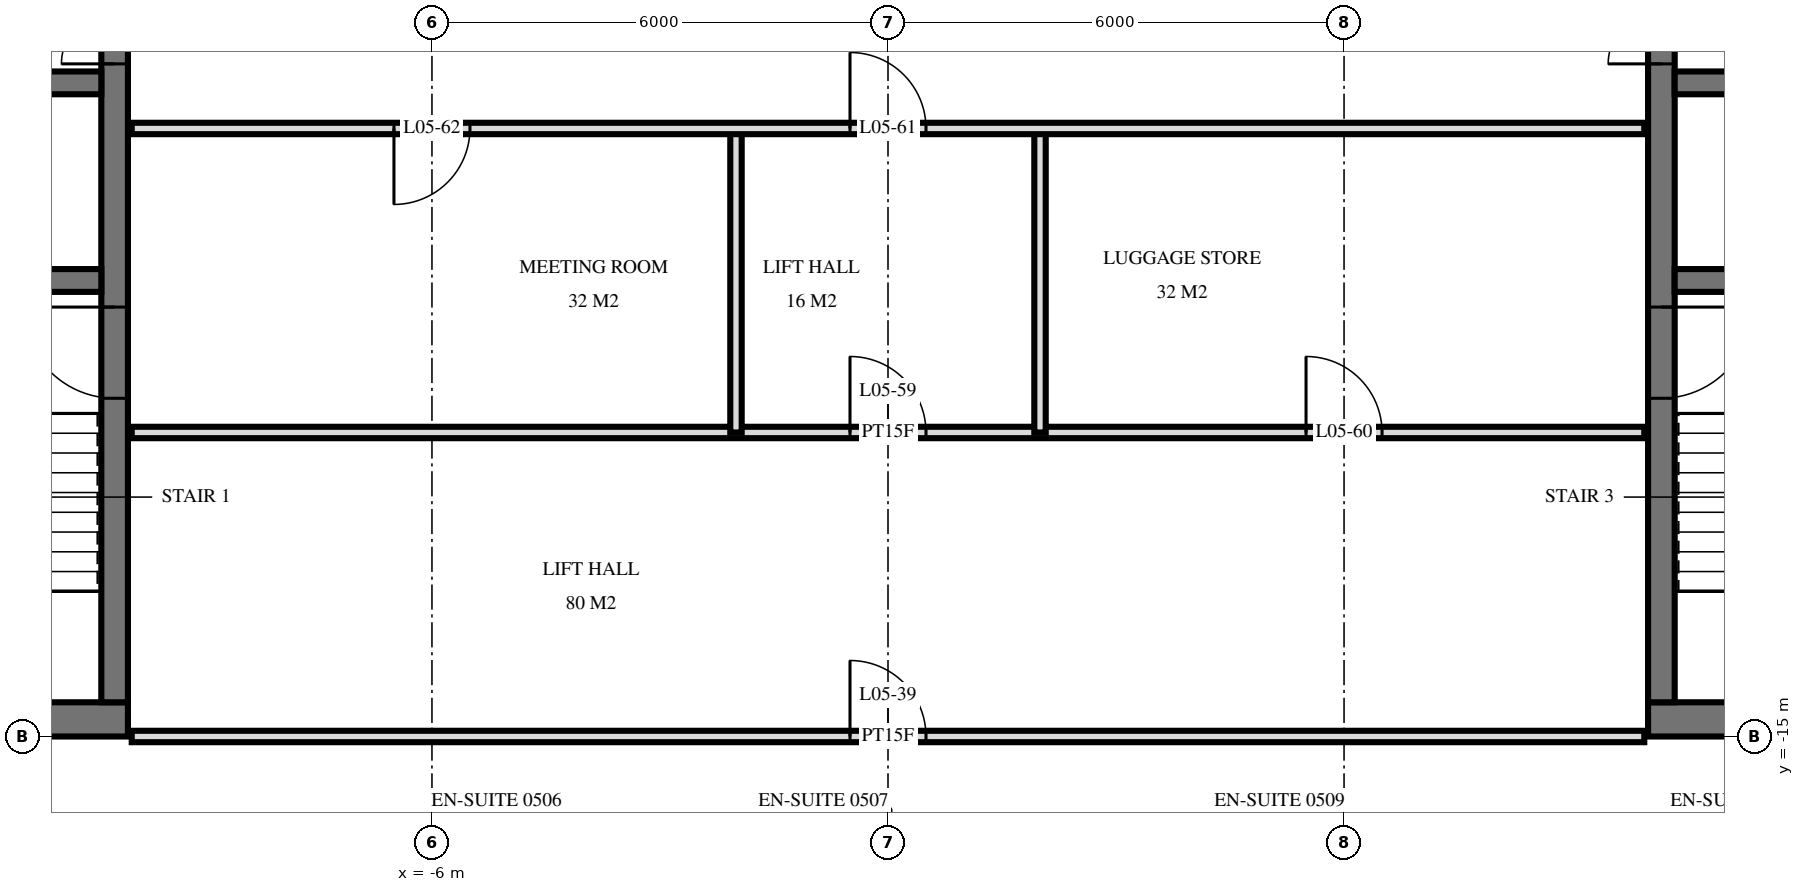
"""IFC4 building model, lengths in metres.
Left out: names, types, materials, properties, quantities, classifications, styles, units other than length and angle.
Written with IfcOpenShell. Run it as: python <this file> out.ifc"""

import sys

from ifc_helpers import new_model, si_unit, direction, frame, frame_2d, origin, place, context, subcontext, project, spatial, rectangle, extrude, element, fill, save


model = new_model("IFC4")
c1 = context("Model", 3, precision=1e-05, world=origin(), true_north=direction((0.0, 1.0)))
c2 = subcontext(c1, "Body", "Model", "MODEL_VIEW")
j1 = project(units=[si_unit("LENGTHUNIT", "METRE"), si_unit("PLANEANGLEUNIT", "RADIAN")], contexts=[c1])
p1 = place(None, origin())
s1 = spatial("IfcSite", under=j1, at=p1, CompositionType="ELEMENT")
p2 = place(p1, origin())
s2 = spatial("IfcBuilding", under=s1, at=p2, CompositionType="ELEMENT")
p3 = place(p2, frame((0.0, 0.0, 27.6)))
s3 = spatial("IfcBuildingStorey", under=s2, at=p3, CompositionType="ELEMENT", Elevation=27.6)
p4 = place(p3, frame((-29.5, -14.775, 0.0), z_axis=(0.0, 0.0, 1.0), x_axis=(1.0, 0.0, 0.0)))
e1 = element("IfcWall", 1, at=p4, inside=s3, PredefinedType="SHEAR", context=c2, shape_type="SweptSolid", body=[
    extrude(rectangle(XDim=19.5, YDim=0.45, at=frame_2d((9.75, 0.0))), origin(), (0.0, 0.0, 1.0), 3.6),
])
p5 = place(p4, frame((11.2, 0.0, 0.0)))
e2 = element("IfcOpeningElement", 2, at=p5, cuts=e1, PredefinedType="OPENING", context=c2, shape_type="SweptSolid", body=[
    extrude(rectangle(XDim=1.2, YDim=2.1, at=frame_2d((0.6, 1.05))), frame((0.0, 0.235, 0.0), z_axis=(0.0, -1.0, 0.0), x_axis=(1.0, 0.0, 0.0)), (0.0, 0.0, 1.0), 0.47),
])
p6 = place(p4, frame((14.25, 0.0, 0.0)))
e3 = element("IfcOpeningElement", 3, at=p6, cuts=e1, PredefinedType="OPENING", context=c2, shape_type="SweptSolid", body=[
    extrude(rectangle(XDim=1.1, YDim=2.1, at=frame_2d((0.55, 1.05))), frame((0.0, 0.235, 0.0), z_axis=(0.0, -1.0, 0.0), x_axis=(1.0, 0.0, 0.0)), (0.0, 0.0, 1.0), 0.47),
])
p7 = place(p4, frame((8.5, 0.0, 0.0)))
e4 = element("IfcOpeningElement", 4, at=p7, cuts=e1, PredefinedType="OPENING", context=c2, shape_type="SweptSolid", body=[
    extrude(rectangle(XDim=0.9, YDim=2.1, at=frame_2d((0.45, 1.05))), frame((0.0, 0.235, 0.0), z_axis=(0.0, -1.0, 0.0), x_axis=(1.0, 0.0, 0.0)), (0.0, 0.0, 1.0), 0.47),
])
p8 = place(p4, frame((6.05, 0.0, 0.0)))
e5 = element("IfcOpeningElement", 5, at=p8, cuts=e1, PredefinedType="OPENING", context=c2, shape_type="SweptSolid", body=[
    extrude(rectangle(XDim=1.0, YDim=2.1, at=frame_2d((0.5, 1.05))), frame((0.0, 0.235, 0.0), z_axis=(0.0, -1.0, 0.0), x_axis=(1.0, 0.0, 0.0)), (0.0, 0.0, 1.0), 0.47),
])
p9 = place(p4, frame((2.25, 0.0, 0.0)))
e6 = element("IfcOpeningElement", 6, at=p9, cuts=e1, PredefinedType="OPENING", context=c2, shape_type="SweptSolid", body=[
    extrude(rectangle(XDim=1.0, YDim=2.1, at=frame_2d((0.5, 1.05))), frame((0.0, 0.235, 0.0), z_axis=(0.0, -1.0, 0.0), x_axis=(1.0, 0.0, 0.0)), (0.0, 0.0, 1.0), 0.47),
])
p10 = place(p3, frame((-10.175, -14.55, 0.0), z_axis=(0.0, 0.0, 1.0), x_axis=(0.0, 1.0, 0.0)))
e7 = element("IfcWall", 7, at=p10, inside=s3, PredefinedType="SHEAR", context=c2, shape_type="SweptSolid", body=[
    extrude(rectangle(XDim=14.1, YDim=0.35, at=frame_2d((7.05, 0.0))), origin(), (0.0, 0.0, 1.0), 3.6),
])
p11 = place(p10, frame((8.4, 0.0, 0.0)))
e8 = element("IfcOpeningElement", 8, at=p11, cuts=e7, PredefinedType="OPENING", context=c2, shape_type="SweptSolid", body=[
    extrude(rectangle(XDim=1.4, YDim=2.4, at=frame_2d((0.7, 1.2))), frame((0.0, 0.185, 0.0), z_axis=(0.0, -1.0, 0.0), x_axis=(1.0, 0.0, 0.0)), (0.0, 0.0, 1.0), 0.37),
])
p12 = place(p10, frame((10.0, 0.0, 0.0)))
e9 = element("IfcOpeningElement", 9, at=p12, cuts=e7, PredefinedType="OPENING", context=c2, shape_type="SweptSolid", body=[
    extrude(rectangle(XDim=1.4, YDim=2.4, at=frame_2d((0.7, 1.2))), frame((0.0, 0.185, 0.0), z_axis=(0.0, -1.0, 0.0), x_axis=(1.0, 0.0, 0.0)), (0.0, 0.0, 1.0), 0.37),
])
p13 = place(p10, frame((4.0, 0.0, 0.0)))
e10 = element("IfcOpeningElement", 10, at=p13, cuts=e7, PredefinedType="OPENING", context=c2, shape_type="SweptSolid", body=[
    extrude(rectangle(XDim=1.2, YDim=2.1, at=frame_2d((0.6, 1.05))), frame((0.0, 0.185, 0.0), z_axis=(0.0, -1.0, 0.0), x_axis=(1.0, 0.0, 0.0)), (0.0, 0.0, 1.0), 0.37),
])
p14 = place(p3, frame((-29.05, -6.4, 0.0), z_axis=(0.0, 0.0, 1.0), x_axis=(1.0, 0.0, 0.0)))
e11 = element("IfcWall", 11, at=p14, inside=s3, PredefinedType="SHEAR", context=c2, shape_type="SweptSolid", body=[
    extrude(rectangle(XDim=18.7, YDim=0.3, at=frame_2d((9.35, 0.0))), origin(), (0.0, 0.0, 1.0), 3.6),
])
p15 = place(p14, frame((2.95, 0.0, 0.0)))
e12 = element("IfcOpeningElement", 12, at=p15, cuts=e11, PredefinedType="OPENING", context=c2, shape_type="SweptSolid", body=[
    extrude(rectangle(XDim=1.1, YDim=2.1, at=frame_2d((0.55, 1.05))), frame((0.0, 0.16, 0.0), z_axis=(0.0, -1.0, 0.0), x_axis=(1.0, 0.0, 0.0)), (0.0, 0.0, 1.0), 0.32),
])
p16 = place(p14, frame((0.55, 0.0, 0.0)))
e13 = element("IfcOpeningElement", 13, at=p16, cuts=e11, PredefinedType="OPENING", context=c2, shape_type="SweptSolid", body=[
    extrude(rectangle(XDim=1.1, YDim=2.1, at=frame_2d((0.55, 1.05))), frame((0.0, 0.16, 0.0), z_axis=(0.0, -1.0, 0.0), x_axis=(1.0, 0.0, 0.0)), (0.0, 0.0, 1.0), 0.32),
])
p17 = place(p14, frame((10.8, 0.0, 0.0)))
e14 = element("IfcOpeningElement", 14, at=p17, cuts=e11, PredefinedType="OPENING", context=c2, shape_type="SweptSolid", body=[
    extrude(rectangle(XDim=1.1, YDim=2.1, at=frame_2d((0.55, 1.05))), frame((0.0, 0.16, 0.0), z_axis=(0.0, -1.0, 0.0), x_axis=(1.0, 0.0, 0.0)), (0.0, 0.0, 1.0), 0.32),
])
p18 = place(p14, frame((5.6, 0.0, 0.0)))
e15 = element("IfcOpeningElement", 15, at=p18, cuts=e11, PredefinedType="OPENING", context=c2, shape_type="SweptSolid", body=[
    extrude(rectangle(XDim=1.0, YDim=2.1, at=frame_2d((0.5, 1.05))), frame((0.0, 0.16, 0.0), z_axis=(0.0, -1.0, 0.0), x_axis=(1.0, 0.0, 0.0)), (0.0, 0.0, 1.0), 0.32),
])
p19 = place(p3, frame((-29.05, -9.0, 0.0), z_axis=(0.0, 0.0, 1.0), x_axis=(1.0, 0.0, 0.0)))
e16 = element("IfcWall", 16, at=p19, inside=s3, PredefinedType="SHEAR", context=c2, shape_type="SweptSolid", body=[
    extrude(rectangle(XDim=18.7, YDim=0.3, at=frame_2d((9.35, 0.0))), origin(), (0.0, 0.0, 1.0), 3.6),
])
p20 = place(p19, frame((13.8, 0.0, 0.0)))
e17 = element("IfcOpeningElement", 17, at=p20, cuts=e16, PredefinedType="OPENING", context=c2, shape_type="SweptSolid", body=[
    extrude(rectangle(XDim=1.1, YDim=2.1, at=frame_2d((0.55, 1.05))), frame((0.0, 0.16, 0.0), z_axis=(0.0, -1.0, 0.0), x_axis=(1.0, 0.0, 0.0)), (0.0, 0.0, 1.0), 0.32),
])
p21 = place(p3, frame((10.0, -14.775, 0.0), z_axis=(0.0, 0.0, 1.0), x_axis=(1.0, 0.0, 0.0)))
e18 = element("IfcWall", 18, at=p21, inside=s3, PredefinedType="SHEAR", context=c2, shape_type="SweptSolid", body=[
    extrude(rectangle(XDim=19.5, YDim=0.45, at=frame_2d((9.75, 0.0))), origin(), (0.0, 0.0, 1.0), 3.6),
])
p22 = place(p21, frame((7.1, 0.0, 0.0)))
e19 = element("IfcOpeningElement", 19, at=p22, cuts=e18, PredefinedType="OPENING", context=c2, shape_type="SweptSolid", body=[
    extrude(rectangle(XDim=1.2, YDim=2.1, at=frame_2d((0.6, 1.05))), frame((0.0, 0.235, 0.0), z_axis=(0.0, -1.0, 0.0), x_axis=(1.0, 0.0, 0.0)), (0.0, 0.0, 1.0), 0.47),
])
p23 = place(p21, frame((4.15, 0.0, 0.0)))
e20 = element("IfcOpeningElement", 20, at=p23, cuts=e18, PredefinedType="OPENING", context=c2, shape_type="SweptSolid", body=[
    extrude(rectangle(XDim=1.1, YDim=2.1, at=frame_2d((0.55, 1.05))), frame((0.0, 0.235, 0.0), z_axis=(0.0, -1.0, 0.0), x_axis=(1.0, 0.0, 0.0)), (0.0, 0.0, 1.0), 0.47),
])
p24 = place(p21, frame((10.1, 0.0, 0.0)))
e21 = element("IfcOpeningElement", 21, at=p24, cuts=e18, PredefinedType="OPENING", context=c2, shape_type="SweptSolid", body=[
    extrude(rectangle(XDim=0.9, YDim=2.1, at=frame_2d((0.45, 1.05))), frame((0.0, 0.235, 0.0), z_axis=(0.0, -1.0, 0.0), x_axis=(1.0, 0.0, 0.0)), (0.0, 0.0, 1.0), 0.47),
])
p25 = place(p21, frame((12.45, 0.0, 0.0)))
e22 = element("IfcOpeningElement", 22, at=p25, cuts=e18, PredefinedType="OPENING", context=c2, shape_type="SweptSolid", body=[
    extrude(rectangle(XDim=1.0, YDim=2.1, at=frame_2d((0.5, 1.05))), frame((0.0, 0.235, 0.0), z_axis=(0.0, -1.0, 0.0), x_axis=(1.0, 0.0, 0.0)), (0.0, 0.0, 1.0), 0.47),
])
p26 = place(p21, frame((16.25, 0.0, 0.0)))
e23 = element("IfcOpeningElement", 23, at=p26, cuts=e18, PredefinedType="OPENING", context=c2, shape_type="SweptSolid", body=[
    extrude(rectangle(XDim=1.0, YDim=2.1, at=frame_2d((0.5, 1.05))), frame((0.0, 0.235, 0.0), z_axis=(0.0, -1.0, 0.0), x_axis=(1.0, 0.0, 0.0)), (0.0, 0.0, 1.0), 0.47),
])
p27 = place(p3, frame((10.175, -14.55, 0.0), z_axis=(0.0, 0.0, 1.0), x_axis=(0.0, 1.0, 0.0)))
e24 = element("IfcWall", 24, at=p27, inside=s3, PredefinedType="SHEAR", context=c2, shape_type="SweptSolid", body=[
    extrude(rectangle(XDim=14.1, YDim=0.35, at=frame_2d((7.05, 0.0))), origin(), (0.0, 0.0, 1.0), 3.6),
])
p28 = place(p27, frame((8.4, 0.0, 0.0)))
e25 = element("IfcOpeningElement", 25, at=p28, cuts=e24, PredefinedType="OPENING", context=c2, shape_type="SweptSolid", body=[
    extrude(rectangle(XDim=1.4, YDim=2.4, at=frame_2d((0.7, 1.2))), frame((0.0, 0.185, 0.0), z_axis=(0.0, -1.0, 0.0), x_axis=(1.0, 0.0, 0.0)), (0.0, 0.0, 1.0), 0.37),
])
p29 = place(p27, frame((10.0, 0.0, 0.0)))
e26 = element("IfcOpeningElement", 26, at=p29, cuts=e24, PredefinedType="OPENING", context=c2, shape_type="SweptSolid", body=[
    extrude(rectangle(XDim=1.4, YDim=2.4, at=frame_2d((0.7, 1.2))), frame((0.0, 0.185, 0.0), z_axis=(0.0, -1.0, 0.0), x_axis=(1.0, 0.0, 0.0)), (0.0, 0.0, 1.0), 0.37),
])
p30 = place(p27, frame((4.0, 0.0, 0.0)))
e27 = element("IfcOpeningElement", 27, at=p30, cuts=e24, PredefinedType="OPENING", context=c2, shape_type="SweptSolid", body=[
    extrude(rectangle(XDim=1.2, YDim=2.1, at=frame_2d((0.6, 1.05))), frame((0.0, 0.185, 0.0), z_axis=(0.0, -1.0, 0.0), x_axis=(1.0, 0.0, 0.0)), (0.0, 0.0, 1.0), 0.37),
])
p31 = place(p3, frame((10.35, -6.4, 0.0), z_axis=(0.0, 0.0, 1.0), x_axis=(1.0, 0.0, 0.0)))
e28 = element("IfcWall", 28, at=p31, inside=s3, PredefinedType="SHEAR", context=c2, shape_type="SweptSolid", body=[
    extrude(rectangle(XDim=18.7, YDim=0.3, at=frame_2d((9.35, 0.0))), origin(), (0.0, 0.0, 1.0), 3.6),
])
p32 = place(p31, frame((14.65, 0.0, 0.0)))
e29 = element("IfcOpeningElement", 29, at=p32, cuts=e28, PredefinedType="OPENING", context=c2, shape_type="SweptSolid", body=[
    extrude(rectangle(XDim=1.1, YDim=2.1, at=frame_2d((0.55, 1.05))), frame((0.0, 0.16, 0.0), z_axis=(0.0, -1.0, 0.0), x_axis=(1.0, 0.0, 0.0)), (0.0, 0.0, 1.0), 0.32),
])
p33 = place(p31, frame((17.05, 0.0, 0.0)))
e30 = element("IfcOpeningElement", 30, at=p33, cuts=e28, PredefinedType="OPENING", context=c2, shape_type="SweptSolid", body=[
    extrude(rectangle(XDim=1.1, YDim=2.1, at=frame_2d((0.55, 1.05))), frame((0.0, 0.16, 0.0), z_axis=(0.0, -1.0, 0.0), x_axis=(1.0, 0.0, 0.0)), (0.0, 0.0, 1.0), 0.32),
])
p34 = place(p31, frame((6.8, 0.0, 0.0)))
e31 = element("IfcOpeningElement", 31, at=p34, cuts=e28, PredefinedType="OPENING", context=c2, shape_type="SweptSolid", body=[
    extrude(rectangle(XDim=1.1, YDim=2.1, at=frame_2d((0.55, 1.05))), frame((0.0, 0.16, 0.0), z_axis=(0.0, -1.0, 0.0), x_axis=(1.0, 0.0, 0.0)), (0.0, 0.0, 1.0), 0.32),
])
p35 = place(p31, frame((12.1, 0.0, 0.0)))
e32 = element("IfcOpeningElement", 32, at=p35, cuts=e28, PredefinedType="OPENING", context=c2, shape_type="SweptSolid", body=[
    extrude(rectangle(XDim=1.0, YDim=2.1, at=frame_2d((0.5, 1.05))), frame((0.0, 0.16, 0.0), z_axis=(0.0, -1.0, 0.0), x_axis=(1.0, 0.0, 0.0)), (0.0, 0.0, 1.0), 0.32),
])
p36 = place(p3, frame((10.35, -9.0, 0.0), z_axis=(0.0, 0.0, 1.0), x_axis=(1.0, 0.0, 0.0)))
e33 = element("IfcWall", 33, at=p36, inside=s3, PredefinedType="SHEAR", context=c2, shape_type="SweptSolid", body=[
    extrude(rectangle(XDim=18.7, YDim=0.3, at=frame_2d((9.35, 0.0))), origin(), (0.0, 0.0, 1.0), 3.6),
])
p37 = place(p36, frame((3.8, 0.0, 0.0)))
e34 = element("IfcOpeningElement", 34, at=p37, cuts=e33, PredefinedType="OPENING", context=c2, shape_type="SweptSolid", body=[
    extrude(rectangle(XDim=1.1, YDim=2.1, at=frame_2d((0.55, 1.05))), frame((0.0, 0.16, 0.0), z_axis=(0.0, -1.0, 0.0), x_axis=(1.0, 0.0, 0.0)), (0.0, 0.0, 1.0), 0.32),
])
for number, where, z_axis, x_axis in (
    (35, (2.0, -11.0, 0.0), (0.0, 0.0, 1.0), (0.0, 1.0, 0.0)),
    (36, (-2.0, -11.0, 0.0), (0.0, 0.0, 1.0), (0.0, 1.0, 0.0)),
):
    element("IfcWall", number, at=place(p3, frame(where, z_axis=z_axis, x_axis=x_axis)), inside=s3, PredefinedType="PARTITIONING", context=c2, shape_type="SweptSolid", body=[
        extrude(rectangle(XDim=4.0, YDim=0.15, at=frame_2d((2.0, 0.0))), origin(), (0.0, 0.0, 1.0), 3.32),
    ])
p38 = place(p3, frame((-9.95, -15.0, 0.0), z_axis=(0.0, 0.0, 1.0), x_axis=(1.0, 0.0, 0.0)))
e37 = element("IfcWall", 37, at=p38, inside=s3, PredefinedType="PARTITIONING", context=c2, shape_type="SweptSolid", body=[
    extrude(rectangle(XDim=19.9, YDim=0.15, at=frame_2d((9.95, 0.0))), origin(), (0.0, 0.0, 1.0), 2.684),
])
p39 = place(p38, frame((9.45, 0.0, 0.0)))
e38 = element("IfcOpeningElement", 38, at=p39, cuts=e37, PredefinedType="OPENING", context=c2, shape_type="SweptSolid", body=[
    extrude(rectangle(XDim=1.0, YDim=2.1, at=frame_2d((0.5, 1.05))), frame((0.0, 0.085, 0.0), z_axis=(0.0, -1.0, 0.0), x_axis=(1.0, 0.0, 0.0)), (0.0, 0.0, 1.0), 0.17),
])
p40 = place(p3, frame((-9.95, -11.0, 0.0), z_axis=(0.0, 0.0, 1.0), x_axis=(1.0, 0.0, 0.0)))
e39 = element("IfcWall", 39, at=p40, inside=s3, PredefinedType="PARTITIONING", context=c2, shape_type="SweptSolid", body=[
    extrude(rectangle(XDim=19.9, YDim=0.15, at=frame_2d((9.95, 0.0))), origin(), (0.0, 0.0, 1.0), 3.32),
])
p41 = place(p40, frame((9.45, 0.0, 0.0)))
e40 = element("IfcOpeningElement", 40, at=p41, cuts=e39, PredefinedType="OPENING", context=c2, shape_type="SweptSolid", body=[
    extrude(rectangle(XDim=1.0, YDim=2.1, at=frame_2d((0.5, 1.05))), frame((0.0, 0.085, 0.0), z_axis=(0.0, -1.0, 0.0), x_axis=(1.0, 0.0, 0.0)), (0.0, 0.0, 1.0), 0.17),
])
p42 = place(p40, frame((15.45, 0.0, 0.0)))
e41 = element("IfcOpeningElement", 41, at=p42, cuts=e39, PredefinedType="OPENING", context=c2, shape_type="SweptSolid", body=[
    extrude(rectangle(XDim=1.0, YDim=2.1, at=frame_2d((0.5, 1.05))), frame((0.0, 0.085, 0.0), z_axis=(0.0, -1.0, 0.0), x_axis=(1.0, 0.0, 0.0)), (0.0, 0.0, 1.0), 0.17),
])
p43 = place(p3, frame((-9.95, -7.0, 0.0), z_axis=(0.0, 0.0, 1.0), x_axis=(1.0, 0.0, 0.0)))
e42 = element("IfcWall", 42, at=p43, inside=s3, PredefinedType="PARTITIONING", context=c2, shape_type="SweptSolid", body=[
    extrude(rectangle(XDim=19.9, YDim=0.15, at=frame_2d((9.95, 0.0))), origin(), (0.0, 0.0, 1.0), 3.32),
])
p44 = place(p43, frame((9.45, 0.0, 0.0)))
e43 = element("IfcOpeningElement", 43, at=p44, cuts=e42, PredefinedType="OPENING", context=c2, shape_type="SweptSolid", body=[
    extrude(rectangle(XDim=1.0, YDim=2.1, at=frame_2d((0.5, 1.05))), frame((0.0, 0.085, 0.0), z_axis=(0.0, -1.0, 0.0), x_axis=(1.0, 0.0, 0.0)), (0.0, 0.0, 1.0), 0.17),
])
p45 = place(p43, frame((3.45, 0.0, 0.0)))
e44 = element("IfcOpeningElement", 44, at=p45, cuts=e42, PredefinedType="OPENING", context=c2, shape_type="SweptSolid", body=[
    extrude(rectangle(XDim=1.0, YDim=2.1, at=frame_2d((0.5, 1.05))), frame((0.0, 0.085, 0.0), z_axis=(0.0, -1.0, 0.0), x_axis=(1.0, 0.0, 0.0)), (0.0, 0.0, 1.0), 0.17),
])
p46 = place(p11, origin())
e45 = element("IfcDoor", 45, at=p46, inside=s3, OperationType="DOUBLE_DOOR_SINGLE_SWING", PredefinedType="DOOR", context=c2, shape_type="SweptSolid", body=[
    extrude(rectangle(XDim=1.4, YDim=2.4, at=frame_2d((0.7, 1.2))), frame((0.0, 0.025, 0.0), z_axis=(0.0, -1.0, 0.0), x_axis=(1.0, 0.0, 0.0)), (0.0, 0.0, 1.0), 0.05),
])
fill(e8, e45)
p47 = place(p13, origin())
e46 = element("IfcDoor", 46, at=p47, inside=s3, OperationType="SINGLE_SWING_LEFT", PredefinedType="DOOR", context=c2, shape_type="SweptSolid", body=[
    extrude(rectangle(XDim=1.2, YDim=2.1, at=frame_2d((0.6, 1.05))), frame((0.0, 0.025, 0.0), z_axis=(0.0, -1.0, 0.0), x_axis=(1.0, 0.0, 0.0)), (0.0, 0.0, 1.0), 0.05),
])
fill(e10, e46)
p48 = place(p28, origin())
e47 = element("IfcDoor", 47, at=p48, inside=s3, OperationType="DOUBLE_DOOR_SINGLE_SWING", PredefinedType="DOOR", context=c2, shape_type="SweptSolid", body=[
    extrude(rectangle(XDim=1.4, YDim=2.4, at=frame_2d((0.7, 1.2))), frame((0.0, 0.025, 0.0), z_axis=(0.0, -1.0, 0.0), x_axis=(1.0, 0.0, 0.0)), (0.0, 0.0, 1.0), 0.05),
])
fill(e25, e47)
p49 = place(p30, frame((0.6, 0.0, 0.0), z_axis=(0.0, 0.0, 1.0), x_axis=(-1.0, 0.0, 0.0)))
e48 = element("IfcDoor", 48, at=p49, inside=s3, OperationType="SINGLE_SWING_RIGHT", PredefinedType="DOOR", context=c2, shape_type="SweptSolid", body=[
    extrude(rectangle(XDim=1.2, YDim=2.1, at=frame_2d((0.0, 1.05))), frame((0.0, -0.025, 0.0), z_axis=(0.0, 1.0, 0.0), x_axis=(-1.0, 0.0, 0.0)), (0.0, 0.0, 1.0), 0.05),
])
fill(e27, e48)
p50 = place(p39, origin())
e49 = element("IfcDoor", 49, at=p50, inside=s3, OperationType="SINGLE_SWING_RIGHT", PredefinedType="DOOR", context=c2, shape_type="SweptSolid", body=[
    extrude(rectangle(XDim=1.0, YDim=2.1, at=frame_2d((0.5, 1.05))), frame((0.0, 0.025, 0.0), z_axis=(0.0, -1.0, 0.0), x_axis=(1.0, 0.0, 0.0)), (0.0, 0.0, 1.0), 0.05),
])
fill(e38, e49)
p51 = place(p41, origin())
e50 = element("IfcDoor", 50, at=p51, inside=s3, OperationType="SINGLE_SWING_RIGHT", PredefinedType="DOOR", context=c2, shape_type="SweptSolid", body=[
    extrude(rectangle(XDim=1.0, YDim=2.1, at=frame_2d((0.5, 1.05))), frame((0.0, 0.025, 0.0), z_axis=(0.0, -1.0, 0.0), x_axis=(1.0, 0.0, 0.0)), (0.0, 0.0, 1.0), 0.05),
])
fill(e40, e50)
p52 = place(p42, origin())
e51 = element("IfcDoor", 51, at=p52, inside=s3, OperationType="SINGLE_SWING_RIGHT", PredefinedType="DOOR", context=c2, shape_type="SweptSolid", body=[
    extrude(rectangle(XDim=1.0, YDim=2.1, at=frame_2d((0.5, 1.05))), frame((0.0, 0.025, 0.0), z_axis=(0.0, -1.0, 0.0), x_axis=(1.0, 0.0, 0.0)), (0.0, 0.0, 1.0), 0.05),
])
fill(e41, e51)
p53 = place(p44, origin())
e52 = element("IfcDoor", 52, at=p53, inside=s3, OperationType="SINGLE_SWING_RIGHT", PredefinedType="DOOR", context=c2, shape_type="SweptSolid", body=[
    extrude(rectangle(XDim=1.0, YDim=2.1, at=frame_2d((0.5, 1.05))), frame((0.0, 0.025, 0.0), z_axis=(0.0, -1.0, 0.0), x_axis=(1.0, 0.0, 0.0)), (0.0, 0.0, 1.0), 0.05),
])
fill(e43, e52)
p54 = place(p45, frame((0.5, 0.0, 0.0), z_axis=(0.0, 0.0, 1.0), x_axis=(-1.0, 0.0, 0.0)))
e53 = element("IfcDoor", 53, at=p54, inside=s3, OperationType="SINGLE_SWING_LEFT", PredefinedType="DOOR", context=c2, shape_type="SweptSolid", body=[
    extrude(rectangle(XDim=1.0, YDim=2.1, at=frame_2d((0.0, 1.05))), frame((0.0, -0.025, 0.0), z_axis=(0.0, 1.0, 0.0), x_axis=(-1.0, 0.0, 0.0)), (0.0, 0.0, 1.0), 0.05),
])
fill(e44, e53)
save(model, sys.argv[1])
